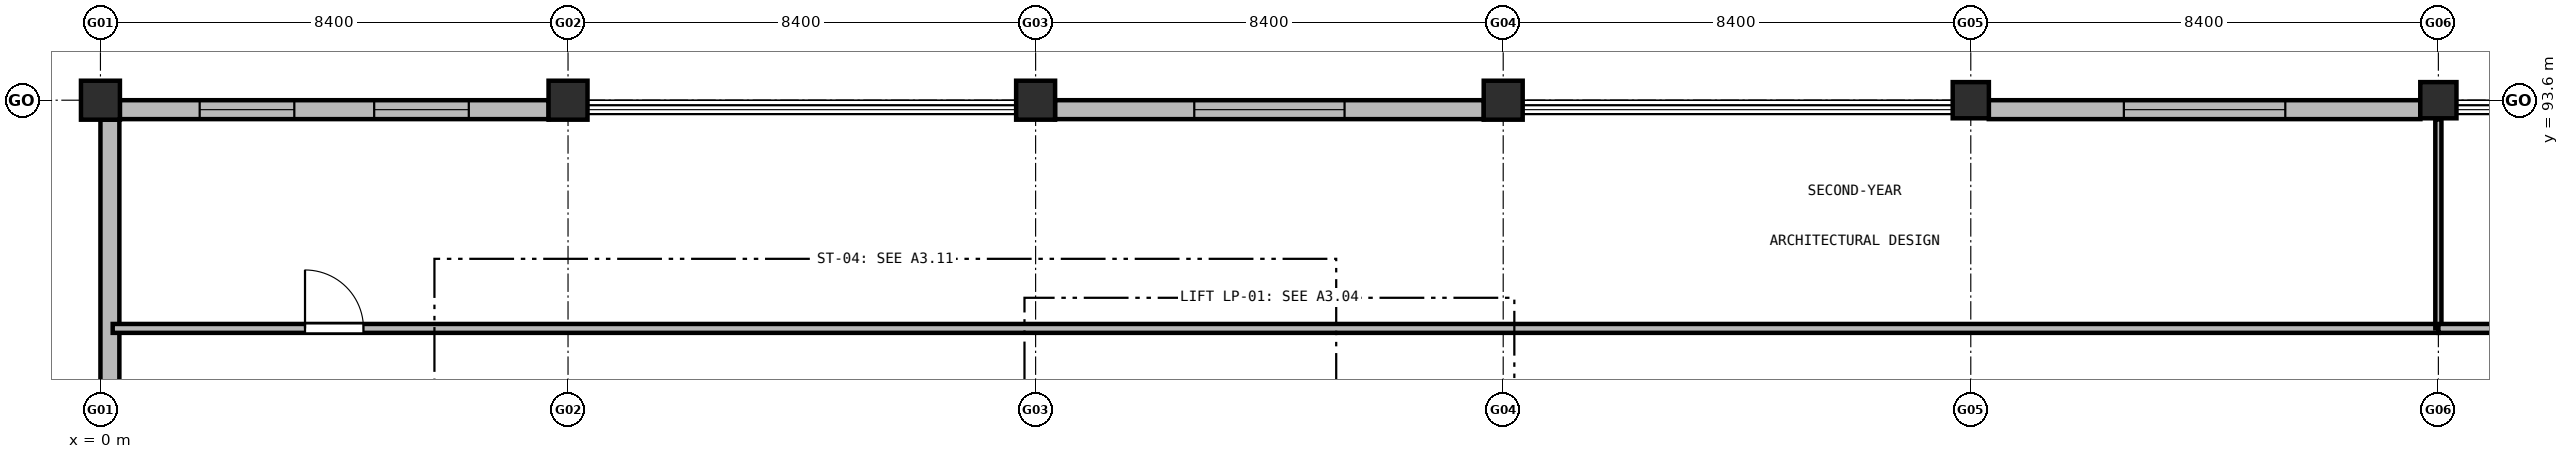
"""IFC4 building model, lengths in metres.
Left out: names, types, materials, properties, quantities, classifications, styles, units other than length and angle.
Written with IfcOpenShell. Run it as: python <this file> out.ifc"""

import sys

from ifc_helpers import new_model, si_unit, direction, frame, frame_2d, origin, origin_2d, place, context, subcontext, project, spatial, rectangle, extrude, element, fill, save


model = new_model("IFC4")
c1 = context("Model", 3, precision=1e-05, world=origin(), true_north=direction((0.0, 1.0)))
c2 = subcontext(c1, "Body", "Model", "MODEL_VIEW")
j1 = project(units=[si_unit("LENGTHUNIT", "METRE"), si_unit("PLANEANGLEUNIT", "RADIAN")], contexts=[c1])
p1 = place(None, origin())
s1 = spatial("IfcSite", under=j1, at=p1, CompositionType="ELEMENT")
p2 = place(p1, origin())
s2 = spatial("IfcBuilding", under=s1, at=p2, CompositionType="ELEMENT")
p3 = place(p2, frame((0.0, 0.0, 5.1)))
s3 = spatial("IfcBuildingStorey", under=s2, at=p3, CompositionType="ELEMENT", Elevation=5.1)
for number, where, z_axis, x_axis in (
    (1, (0.0, 93.6, 0.0), (0.0, 0.0, 1.0), (1.0, 0.0, 0.0)),
    (2, (8.4, 93.6, 0.0), (0.0, 0.0, 1.0), (1.0, 0.0, 0.0)),
    (3, (16.8, 93.6, 0.0), (0.0, 0.0, 1.0), (1.0, 0.0, 0.0)),
    (4, (25.2, 93.6, 0.0), (0.0, 0.0, 1.0), (1.0, 0.0, 0.0)),
):
    element("IfcColumn", number, at=place(p3, frame(where, z_axis=z_axis, x_axis=x_axis)), inside=s3, PredefinedType="COLUMN", context=c2, shape_type="SweptSolid", body=[
        extrude(rectangle(XDim=0.7, YDim=0.7, at=origin_2d()), origin(), (0.0, 0.0, 1.0), 4.2),
    ])
for number, where, z_axis, x_axis in (
    (5, (33.6, 93.6, 0.0), (0.0, 0.0, 1.0), (1.0, 0.0, 0.0)),
    (6, (42.0, 93.6, 0.0), (0.0, 0.0, 1.0), (1.0, 0.0, 0.0)),
):
    element("IfcColumn", number, at=place(p3, frame(where, z_axis=z_axis, x_axis=x_axis)), inside=s3, PredefinedType="COLUMN", context=c2, shape_type="SweptSolid", body=[
        extrude(rectangle(XDim=0.65, YDim=0.65, at=origin_2d()), origin(), (0.0, 0.0, 1.0), 4.2),
    ])
p4 = place(p3, frame((0.17, 86.748, 0.0), z_axis=(0.0, 0.0, 1.0), x_axis=(0.0, 1.0, 0.0)))
e7 = element("IfcWall", 7, at=p4, inside=s3, PredefinedType="SOLIDWALL", context=c2, shape_type="SweptSolid", body=[
    extrude(rectangle(XDim=6.504, YDim=0.34, at=frame_2d((3.252, 0.0))), origin(), (0.0, 0.0, 1.0), 3.31),
])
p5 = place(p3, frame((0.348, 93.43, 0.0), z_axis=(0.0, 0.0, 1.0), x_axis=(1.0, 0.0, 0.0)))
e8 = element("IfcWall", 8, at=p5, inside=s3, PredefinedType="SOLIDWALL", context=c2, shape_type="SweptSolid", body=[
    extrude(rectangle(XDim=7.704, YDim=0.34, at=frame_2d((3.852, 0.0))), origin(), (0.0, 0.0, 1.0), 3.11),
])
p6 = place(p5, frame((1.435, 0.0, 0.95)))
e9 = element("IfcOpeningElement", 9, at=p6, cuts=e8, PredefinedType="OPENING", context=c2, shape_type="SweptSolid", body=[
    extrude(rectangle(XDim=1.7, YDim=1.65, at=frame_2d((0.85, 0.825))), frame((0.0, 0.18, 0.0), z_axis=(0.0, -1.0, 0.0), x_axis=(1.0, 0.0, 0.0)), (0.0, 0.0, 1.0), 0.36),
])
p7 = place(p5, frame((4.569, 0.0, 0.95)))
e10 = element("IfcOpeningElement", 10, at=p7, cuts=e8, PredefinedType="OPENING", context=c2, shape_type="SweptSolid", body=[
    extrude(rectangle(XDim=1.7, YDim=1.65, at=frame_2d((0.85, 0.825))), frame((0.0, 0.18, 0.0), z_axis=(0.0, -1.0, 0.0), x_axis=(1.0, 0.0, 0.0)), (0.0, 0.0, 1.0), 0.36),
])
p8 = place(p3, frame((17.148, 93.43, 0.0), z_axis=(0.0, 0.0, 1.0), x_axis=(1.0, 0.0, 0.0)))
e11 = element("IfcWall", 11, at=p8, inside=s3, PredefinedType="SOLIDWALL", context=c2, shape_type="SweptSolid", body=[
    extrude(rectangle(XDim=7.704, YDim=0.34, at=frame_2d((3.852, 0.0))), origin(), (0.0, 0.0, 1.0), 3.11),
])
p9 = place(p8, frame((2.502, 0.0, 0.95)))
e12 = element("IfcOpeningElement", 12, at=p9, cuts=e11, PredefinedType="OPENING", context=c2, shape_type="SweptSolid", body=[
    extrude(rectangle(XDim=2.7, YDim=1.9, at=frame_2d((1.35, 0.95))), frame((0.0, 0.18, 0.0), z_axis=(0.0, -1.0, 0.0), x_axis=(1.0, 0.0, 0.0)), (0.0, 0.0, 1.0), 0.36),
])
p10 = place(p3, frame((33.923, 93.43, 0.0), z_axis=(0.0, 0.0, 1.0), x_axis=(1.0, 0.0, 0.0)))
e13 = element("IfcWall", 13, at=p10, inside=s3, PredefinedType="SOLIDWALL", context=c2, shape_type="SweptSolid", body=[
    extrude(rectangle(XDim=7.754, YDim=0.34, at=frame_2d((3.877, 0.0))), origin(), (0.0, 0.0, 1.0), 3.11),
])
p11 = place(p10, frame((2.427, 0.0, 0.95)))
e14 = element("IfcOpeningElement", 14, at=p11, cuts=e13, PredefinedType="OPENING", context=c2, shape_type="SweptSolid", body=[
    extrude(rectangle(XDim=2.9, YDim=1.75, at=frame_2d((1.45, 0.875))), frame((0.0, 0.18, 0.0), z_axis=(0.0, -1.0, 0.0), x_axis=(1.0, 0.0, 0.0)), (0.0, 0.0, 1.0), 0.36),
])
p12 = place(p3, frame((0.22, 89.5, 0.0), z_axis=(0.0, 0.0, 1.0), x_axis=(1.0, 0.0, 0.0)))
e15 = element("IfcWall", 15, at=p12, inside=s3, PredefinedType="PARTITIONING", context=c2, shape_type="SweptSolid", body=[
    extrude(rectangle(XDim=41.78, YDim=0.16, at=frame_2d((20.89, 0.0))), origin(), (0.0, 0.0, 1.0), 3.305),
])
p13 = place(p12, frame((3.455, 0.0, 0.0)))
e16 = element("IfcOpeningElement", 16, at=p13, cuts=e15, PredefinedType="OPENING", context=c2, shape_type="SweptSolid", body=[
    extrude(rectangle(XDim=1.05, YDim=2.15, at=frame_2d((0.525, 1.075))), frame((0.0, 0.09, 0.0), z_axis=(0.0, -1.0, 0.0), x_axis=(1.0, 0.0, 0.0)), (0.0, 0.0, 1.0), 0.18),
])
p14 = place(p3, frame((42.0, 89.5, 0.0), z_axis=(0.0, 0.0, 1.0), x_axis=(0.0, 1.0, 0.0)))
e17 = element("IfcWall", 17, at=p14, inside=s3, PredefinedType="PARTITIONING", context=c2, shape_type="SweptSolid", body=[
    extrude(rectangle(XDim=3.755, YDim=0.11, at=frame_2d((1.877, 0.0))), origin(), (0.0, 0.0, 1.0), 3.105),
])
p15 = place(p3, frame((42.0, 89.5, 0.0), z_axis=(0.0, 0.0, 1.0), x_axis=(1.0, 0.0, 0.0)))
e18 = element("IfcWall", 18, at=p15, inside=s3, PredefinedType="PARTITIONING", context=c2, shape_type="SweptSolid", body=[
    extrude(rectangle(XDim=33.6, YDim=0.16, at=frame_2d((16.8, 0.0))), origin(), (0.0, 0.0, 1.0), 3.305),
])
p16 = place(p15, frame((3.7, 0.0, 0.0)))
e19 = element("IfcOpeningElement", 19, at=p16, cuts=e18, PredefinedType="OPENING", context=c2, shape_type="SweptSolid", body=[
    extrude(rectangle(XDim=1.0, YDim=2.1, at=frame_2d((0.5, 1.05))), frame((0.0, 0.09, 0.0), z_axis=(0.0, -1.0, 0.0), x_axis=(1.0, 0.0, 0.0)), (0.0, 0.0, 1.0), 0.18),
])
p17 = place(p6, origin())
e20 = element("IfcWindow", 20, at=p17, inside=s3, PartitioningType="SINGLE_PANEL", PredefinedType="WINDOW", context=c2, shape_type="SweptSolid", body=[
    extrude(rectangle(XDim=1.7, YDim=1.65, at=frame_2d((0.85, 0.825))), frame((0.0, 0.03, 0.0), z_axis=(0.0, -1.0, 0.0), x_axis=(1.0, 0.0, 0.0)), (0.0, 0.0, 1.0), 0.06),
])
fill(e9, e20)
p18 = place(p7, origin())
e21 = element("IfcWindow", 21, at=p18, inside=s3, PartitioningType="SINGLE_PANEL", PredefinedType="WINDOW", context=c2, shape_type="SweptSolid", body=[
    extrude(rectangle(XDim=1.7, YDim=1.65, at=frame_2d((0.85, 0.825))), frame((0.0, 0.03, 0.0), z_axis=(0.0, -1.0, 0.0), x_axis=(1.0, 0.0, 0.0)), (0.0, 0.0, 1.0), 0.06),
])
fill(e10, e21)
p19 = place(p9, origin())
e22 = element("IfcWindow", 22, at=p19, inside=s3, PartitioningType="SINGLE_PANEL", PredefinedType="WINDOW", context=c2, shape_type="SweptSolid", body=[
    extrude(rectangle(XDim=2.7, YDim=1.9, at=frame_2d((1.35, 0.95))), frame((0.0, 0.03, 0.0), z_axis=(0.0, -1.0, 0.0), x_axis=(1.0, 0.0, 0.0)), (0.0, 0.0, 1.0), 0.06),
])
fill(e12, e22)
p20 = place(p11, origin())
e23 = element("IfcWindow", 23, at=p20, inside=s3, PartitioningType="SINGLE_PANEL", PredefinedType="WINDOW", context=c2, shape_type="SweptSolid", body=[
    extrude(rectangle(XDim=2.9, YDim=1.75, at=frame_2d((1.45, 0.875))), frame((0.0, 0.03, 0.0), z_axis=(0.0, -1.0, 0.0), x_axis=(1.0, 0.0, 0.0)), (0.0, 0.0, 1.0), 0.06),
])
fill(e14, e23)
p21 = place(p13, origin())
e24 = element("IfcDoor", 24, at=p21, inside=s3, OperationType="SINGLE_SWING_LEFT", PredefinedType="DOOR", context=c2, shape_type="SweptSolid", body=[
    extrude(rectangle(XDim=1.05, YDim=2.15, at=frame_2d((0.525, 1.075))), frame((0.0, 0.025, 0.0), z_axis=(0.0, -1.0, 0.0), x_axis=(1.0, 0.0, 0.0)), (0.0, 0.0, 1.0), 0.05),
])
fill(e16, e24)
save(model, sys.argv[1])
